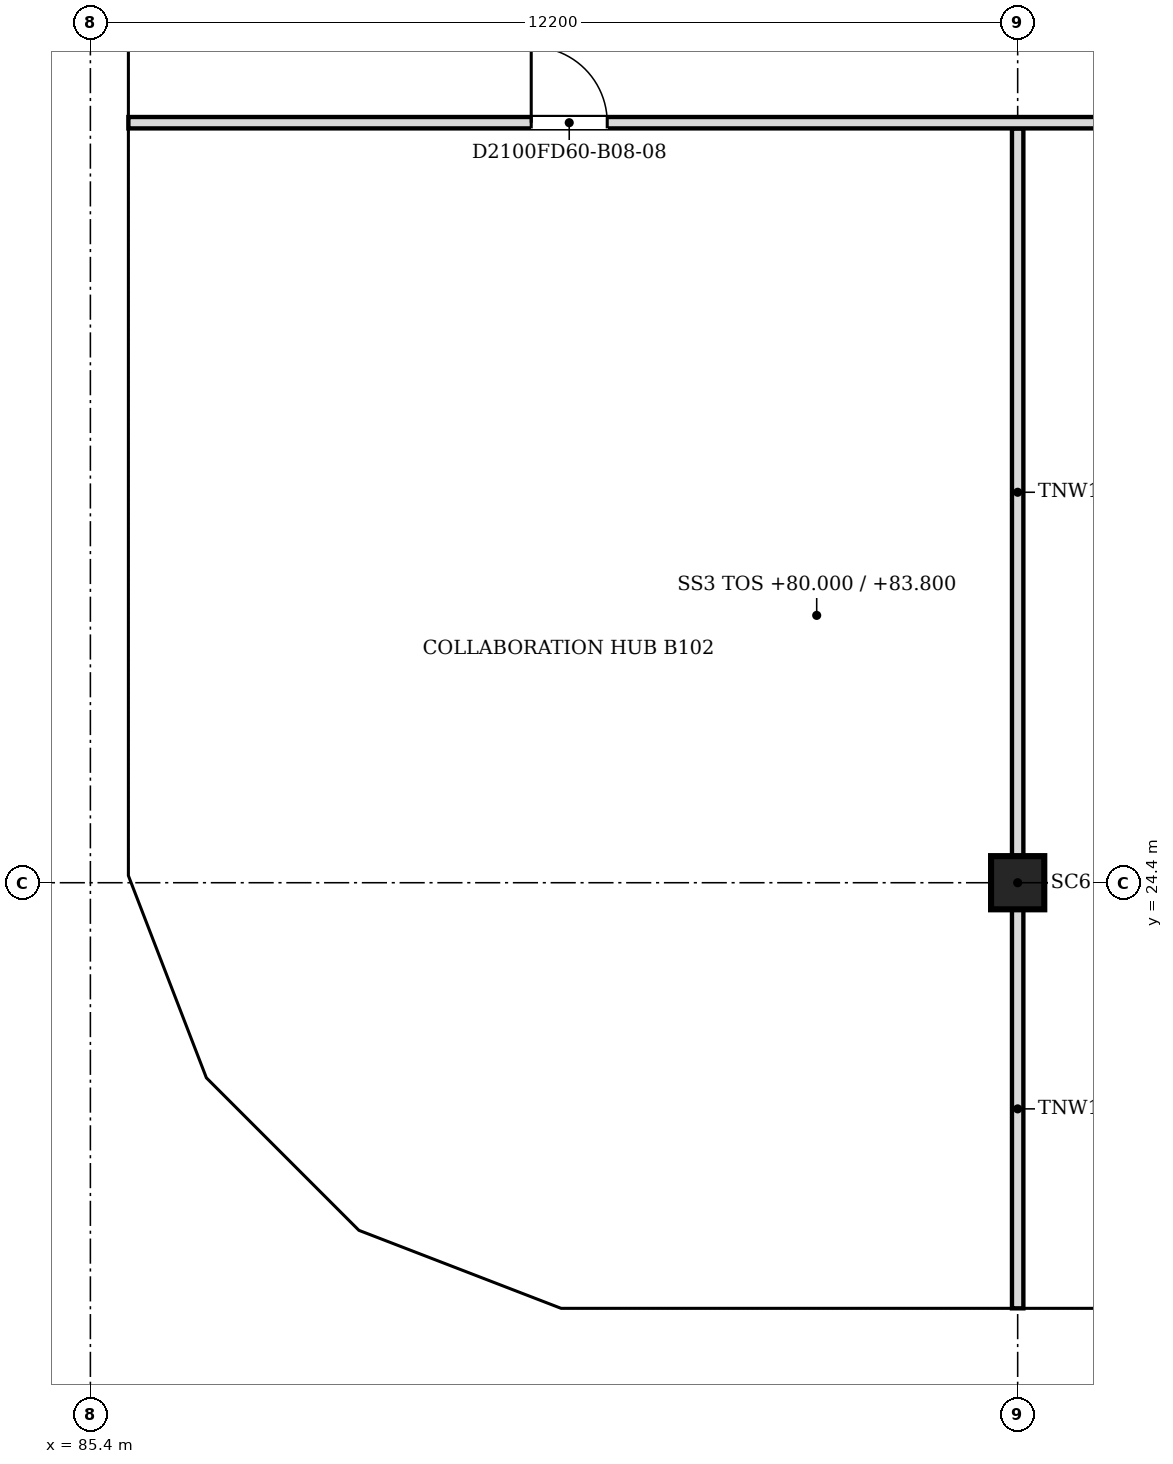
"""IFC4 building model, lengths in metres.
Left out: names, types, materials, properties, quantities, classifications, styles, units other than length and angle.
Written with IfcOpenShell. Run it as: python <this file> out.ifc"""

import sys

from ifc_helpers import new_model, si_unit, direction, frame, frame_2d, origin, origin_2d, place, context, subcontext, project, spatial, polyline, rectangle, outline, extrude, faceted_brep, source, transform, mapped, element, fill, save


model = new_model("IFC4")
c1 = context("Model", 3, precision=1e-05, world=origin(), true_north=direction((0.0, 1.0)))
c2 = subcontext(c1, "Body", "Model", "MODEL_VIEW")
j1 = project(units=[si_unit("LENGTHUNIT", "METRE"), si_unit("PLANEANGLEUNIT", "RADIAN")], contexts=[c1])
p1 = place(None, origin())
s1 = spatial("IfcSite", under=j1, at=p1, CompositionType="ELEMENT")
p2 = place(p1, origin())
s2 = spatial("IfcBuilding", under=s1, at=p2, CompositionType="ELEMENT")
p3 = place(p2, frame((0.0, 0.0, 80.0)))
s3 = spatial("IfcBuildingStorey", under=s2, at=p3, CompositionType="ELEMENT", Elevation=80.0)
p4 = place(p3, frame((97.6, 24.4, 0.0), z_axis=(0.0, 0.0, 1.0), x_axis=(1.0, 0.0, 0.0)))
e1 = element("IfcColumn", 1, at=p4, inside=s3, PredefinedType="COLUMN", context=c2, shape_type="SweptSolid", body=[
    extrude(rectangle(XDim=0.7, YDim=0.7, at=origin_2d()), origin(), (0.0, 0.0, 1.0), 3.6),
])
m1 = source(origin(), c2, "Body", "Brep", [
    faceted_brep([(3.003, -0.25, 0.0), (6.053, -0.25, 3.8), (3.003, -0.25, 7.6), (0.0, -0.25, 3.8), (0.047, 0.25, 3.859), (3.003, 0.25, 7.6), (6.053, 0.25, 3.8), (3.003, 0.25, 0.0), (0.047, 0.25, 3.741), (0.0, 0.0, 3.8)], [[[0, 1, 2, 3]], [[4, 5, 6, 7, 8]], [[7, 6, 1, 0]], [[6, 5, 2, 1]], [[5, 4, 9, 3, 2]], [[8, 7, 0, 3, 9]], [[8, 9, 4]]]),
])
p5 = place(p3, frame((91.547, 18.55, -3.8), z_axis=(0.0, 0.0, 1.0), x_axis=(1.0, 0.0, 0.0)))
e2 = element("IfcWall", 2, at=p5, inside=s3, PredefinedType="SOLIDWALL", context=c2, shape_type="MappedRepresentation", body=[
    mapped(m1, transform((0.0, 0.0, 0.0), scale=1.0)),
])
m2 = source(origin(), c2, "Body", "SweptSolid", [
    extrude(outline(polyline([(3.005, 0.401), (5.733, 3.8), (3.005, 7.199), (0.319, 3.8), (3.005, 0.401)])), frame((0.0, 0.26, 0.0), z_axis=(0.0, -1.0, 0.0), x_axis=(1.0, 0.0, 0.0)), (0.0, 0.0, 1.0), 0.52),
])
p6 = place(p5, origin())
e3 = element("IfcOpeningElement", 3, at=p6, cuts=e2, PredefinedType="OPENING", context=c2, shape_type="MappedRepresentation", body=[
    mapped(m2, transform((0.0, 0.0, 0.0), scale=1.0)),
])
m3 = source(origin(), c2, "Body", "Brep", [
    faceted_brep([(3.05, -0.25, 0.0), (6.1, -0.25, 3.8), (6.1, -0.25, 3.8), (3.05, -0.25, 7.6), (0.0, -0.25, 3.8), (0.0, 0.25, 3.8), (3.05, 0.25, 7.6), (6.1, 0.25, 3.8), (6.1, 0.25, 3.8), (3.05, 0.25, 0.0)], [[[0, 1, 2, 3, 4]], [[5, 6, 7, 8, 9]], [[9, 8, 1, 0]], [[7, 6, 3, 2]], [[6, 5, 4, 3]], [[5, 9, 0, 4]], [[1, 8, 7, 2]]]),
])
p7 = place(p3, frame((97.6, 18.55, -3.8), z_axis=(0.0, 0.0, 1.0), x_axis=(1.0, 0.0, 0.0)))
e4 = element("IfcWall", 4, at=p7, inside=s3, PredefinedType="SOLIDWALL", context=c2, shape_type="MappedRepresentation", body=[
    mapped(m3, transform((0.0, 0.0, 0.0), scale=1.0)),
])
m4 = source(origin(), c2, "Body", "SweptSolid", [
    extrude(outline(polyline([(3.05, 0.399), (5.78, 3.8), (3.05, 7.201), (0.321, 3.8), (3.05, 0.399)])), frame((0.0, 0.26, 0.0), z_axis=(0.0, -1.0, 0.0), x_axis=(1.0, 0.0, 0.0)), (0.0, 0.0, 1.0), 0.52),
])
p8 = place(p7, origin())
e5 = element("IfcOpeningElement", 5, at=p8, cuts=e4, PredefinedType="OPENING", context=c2, shape_type="MappedRepresentation", body=[
    mapped(m4, transform((0.0, 0.0, 0.0), scale=1.0)),
])
p9 = place(p3, frame((85.65, 39.65, -3.8), z_axis=(0.0, 0.0, 1.0), x_axis=(0.0, -1.0, 0.0)))
e6 = element("IfcWall", 6, at=p9, inside=s3, PredefinedType="SOLIDWALL", context=c2, shape_type="MappedRepresentation", body=[
    mapped(m3, transform((0.0, 0.0, 0.0), scale=1.0)),
])
p10 = place(p9, origin())
e7 = element("IfcOpeningElement", 7, at=p10, cuts=e6, PredefinedType="OPENING", context=c2, shape_type="MappedRepresentation", body=[
    mapped(m4, transform((0.0, 0.0, 0.0), scale=1.0)),
])
m5 = source(origin(), c2, "Body", "SweptSolid", [
    extrude(outline(polyline([(3.05, 0.0), (6.1, 3.8), (3.05, 7.6), (0.0, 3.8), (3.05, 0.0)])), frame((0.0, 0.25, 0.0), z_axis=(0.0, -1.0, 0.0), x_axis=(1.0, 0.0, 0.0)), (0.0, 0.0, 1.0), 0.5),
])
p11 = place(p3, frame((85.65, 33.55, -3.8), z_axis=(0.0, 0.0, 1.0), x_axis=(0.0, -1.0, 0.0)))
e8 = element("IfcWall", 8, at=p11, inside=s3, PredefinedType="SOLIDWALL", context=c2, shape_type="MappedRepresentation", body=[
    mapped(m5, transform((0.0, 0.0, 0.0), scale=1.0)),
])
p12 = place(p11, origin())
e9 = element("IfcOpeningElement", 9, at=p12, cuts=e8, PredefinedType="OPENING", context=c2, shape_type="MappedRepresentation", body=[
    mapped(m4, transform((0.0, 0.0, 0.0), scale=1.0)),
])
m6 = source(origin(), c2, "Body", "Brep", [
    faceted_brep([(3.003, -0.25, 0.0), (3.05, -0.25, 0.06), (3.05, -0.25, 7.54), (3.003, -0.25, 7.6), (0.0, -0.25, 3.8), (0.0, 0.25, 3.8), (2.957, 0.25, 7.541), (2.957, 0.25, 0.059), (3.003, 0.0, 0.0), (3.003, 0.0, 7.6)], [[[0, 1, 2, 3, 4]], [[5, 6, 7]], [[1, 0, 8]], [[9, 3, 2]], [[6, 5, 4, 3, 9]], [[5, 7, 8, 0, 4]], [[1, 8, 7, 6, 9, 2]]]),
])
p13 = place(p3, frame((85.65, 27.45, -3.8), z_axis=(0.0, 0.0, 1.0), x_axis=(0.0, -1.0, 0.0)))
e10 = element("IfcWall", 10, at=p13, inside=s3, PredefinedType="SOLIDWALL", context=c2, shape_type="MappedRepresentation", body=[
    mapped(m6, transform((0.0, 0.0, 0.0), scale=1.0)),
])
m7 = source(origin(), c2, "Body", "SweptSolid", [
    extrude(outline(polyline([(2.803, 6.944), (0.319, 3.8), (2.803, 0.656), (2.803, 6.944)])), frame((0.0, 0.26, 0.0), z_axis=(0.0, -1.0, 0.0), x_axis=(1.0, 0.0, 0.0)), (0.0, 0.0, 1.0), 0.52),
])
p14 = place(p13, origin())
e11 = element("IfcOpeningElement", 11, at=p14, cuts=e10, PredefinedType="OPENING", context=c2, shape_type="MappedRepresentation", body=[
    mapped(m7, transform((0.0, 0.0, 0.0), scale=1.0)),
])
m8 = source(origin(), c2, "Body", "Brep", [
    faceted_brep([(0.047, -0.25, 0.0), (2.997, -0.25, 3.8), (0.047, -0.25, 7.6), (0.0, -0.25, 7.541), (0.0, -0.25, 0.059), (0.093, 0.25, 7.54), (2.944, 0.25, 3.868), (2.944, 0.25, 3.732), (0.093, 0.25, 0.06), (2.997, 0.0, 3.8), (0.047, 0.0, 0.0), (0.047, 0.0, 7.6)], [[[0, 1, 2, 3, 4]], [[5, 6, 7, 8]], [[8, 7, 9, 1, 0, 10]], [[6, 5, 11, 2, 1, 9]], [[3, 2, 11]], [[10, 0, 4]], [[8, 10, 4, 3, 11, 5]], [[9, 7, 6]]]),
])
p15 = place(p3, frame((85.633, 24.49, -3.8), z_axis=(0.0, 0.0, 1.0), x_axis=(0.359901446078, -0.932990326376, 0.0)))
e12 = element("IfcWall", 12, at=p15, inside=s3, PredefinedType="SOLIDWALL", context=c2, shape_type="MappedRepresentation", body=[
    mapped(m8, transform((0.0, 0.0, 0.0), scale=1.0)),
])
m9 = source(origin(), c2, "Body", "SweptSolid", [
    extrude(outline(polyline([(0.247, 0.665), (2.681, 3.8), (0.247, 6.935), (0.247, 0.665)])), frame((0.0, 0.26, 0.0), z_axis=(0.0, -1.0, 0.0), x_axis=(1.0, 0.0, 0.0)), (0.0, 0.0, 1.0), 0.52),
])
p16 = place(p15, origin())
e13 = element("IfcOpeningElement", 13, at=p16, cuts=e12, PredefinedType="OPENING", context=c2, shape_type="MappedRepresentation", body=[
    mapped(m9, transform((0.0, 0.0, 0.0), scale=1.0)),
])
m10 = source(origin(), c2, "Body", "Brep", [
    faceted_brep([(2.944, -0.25, 0.0), (2.997, -0.25, 0.068), (2.997, -0.25, 7.532), (2.944, -0.25, 7.6), (0.0, -0.25, 3.8), (0.053, 0.25, 3.868), (2.891, 0.25, 7.532), (2.891, 0.25, 0.068), (0.053, 0.25, 3.732), (2.944, 0.0, 0.0), (2.944, 0.0, 7.6), (0.0, 0.0, 3.8)], [[[0, 1, 2, 3, 4]], [[5, 6, 7, 8]], [[1, 0, 9]], [[10, 3, 2]], [[6, 5, 11, 4, 3, 10]], [[8, 7, 9, 0, 4, 11]], [[8, 11, 5]], [[1, 9, 7, 6, 10, 2]]]),
])
p17 = place(p3, frame((86.712, 21.694, -3.8), z_axis=(0.0, 0.0, 1.0), x_axis=(0.707066050402, -0.707147509625, 0.0)))
e14 = element("IfcWall", 14, at=p17, inside=s3, PredefinedType="SOLIDWALL", context=c2, shape_type="MappedRepresentation", body=[
    mapped(m10, transform((0.0, 0.0, 0.0), scale=1.0)),
])
m11 = source(origin(), c2, "Body", "SweptSolid", [
    extrude(outline(polyline([(2.744, 6.934), (0.316, 3.8), (2.744, 0.666), (2.744, 6.934)])), frame((0.0, 0.26, 0.0), z_axis=(0.0, -1.0, 0.0), x_axis=(1.0, 0.0, 0.0)), (0.0, 0.0, 1.0), 0.52),
])
p18 = place(p17, origin())
e15 = element("IfcOpeningElement", 15, at=p18, cuts=e14, PredefinedType="OPENING", context=c2, shape_type="MappedRepresentation", body=[
    mapped(m11, transform((0.0, 0.0, 0.0), scale=1.0)),
])
m12 = source(origin(), c2, "Body", "Brep", [
    faceted_brep([(0.053, -0.25, 0.0), (3.003, -0.25, 3.8), (0.053, -0.25, 7.6), (0.0, -0.25, 7.532), (0.0, -0.25, 0.068), (0.106, 0.25, 7.532), (2.957, 0.25, 3.86), (2.957, 0.25, 3.74), (0.106, 0.25, 0.068), (3.003, 0.0, 3.8), (0.053, 0.0, 0.0), (0.053, 0.0, 7.6)], [[[0, 1, 2, 3, 4]], [[5, 6, 7, 8]], [[8, 7, 9, 1, 0, 10]], [[6, 5, 11, 2, 1, 9]], [[3, 2, 11]], [[10, 0, 4]], [[8, 10, 4, 3, 11, 5]], [[9, 7, 6]]]),
])
p19 = place(p3, frame((88.744, 19.631, -3.8), z_axis=(0.0, 0.0, 1.0), x_axis=(0.932997369089, -0.359883188373, 0.0)))
e16 = element("IfcWall", 16, at=p19, inside=s3, PredefinedType="SOLIDWALL", context=c2, shape_type="MappedRepresentation", body=[
    mapped(m12, transform((0.0, 0.0, 0.0), scale=1.0)),
])
m13 = source(origin(), c2, "Body", "SweptSolid", [
    extrude(outline(polyline([(0.253, 0.665), (2.687, 3.8), (0.253, 6.935), (0.253, 0.665)])), frame((0.0, 0.26, 0.0), z_axis=(0.0, -1.0, 0.0), x_axis=(1.0, 0.0, 0.0)), (0.0, 0.0, 1.0), 0.52),
])
p20 = place(p19, origin())
e17 = element("IfcOpeningElement", 17, at=p20, cuts=e16, PredefinedType="OPENING", context=c2, shape_type="MappedRepresentation", body=[
    mapped(m13, transform((0.0, 0.0, 0.0), scale=1.0)),
])
p21 = place(p2, frame((0.0, 0.0, 83.8)))
s4 = spatial("IfcBuildingStorey", under=s2, at=p21, CompositionType="ELEMENT", Elevation=83.8)
m14 = source(origin(), c2, "Body", "Brep", [
    faceted_brep([(0.047, -0.25, 0.0), (3.05, -0.25, 3.8), (0.047, -0.25, 7.6), (0.0, -0.25, 7.54), (0.0, -0.25, 0.06), (0.093, 0.25, 7.541), (3.05, 0.25, 3.8), (0.093, 0.25, 0.059), (0.047, 0.0, 0.0), (0.047, 0.0, 7.6)], [[[0, 1, 2, 3, 4]], [[5, 6, 7]], [[7, 6, 1, 0, 8]], [[6, 5, 9, 2, 1]], [[3, 2, 9]], [[8, 0, 4]], [[7, 8, 4, 3, 9, 5]]]),
])
p22 = place(p21, frame((91.5, 18.55, -3.8), z_axis=(0.0, 0.0, 1.0), x_axis=(1.0, 0.0, 0.0)))
e18 = element("IfcWall", 18, at=p22, inside=s4, PredefinedType="SOLIDWALL", context=c2, shape_type="MappedRepresentation", body=[
    mapped(m14, transform((0.0, 0.0, 0.0), scale=1.0)),
])
m15 = source(origin(), c2, "Body", "SweptSolid", [
    extrude(outline(polyline([(0.247, 0.656), (2.731, 3.8), (0.247, 6.944), (0.247, 0.656)])), frame((0.0, 0.26, 0.0), z_axis=(0.0, -1.0, 0.0), x_axis=(1.0, 0.0, 0.0)), (0.0, 0.0, 1.0), 0.52),
])
p23 = place(p22, origin())
e19 = element("IfcOpeningElement", 19, at=p23, cuts=e18, PredefinedType="OPENING", context=c2, shape_type="MappedRepresentation", body=[
    mapped(m15, transform((0.0, 0.0, 0.0), scale=1.0)),
])
m16 = source(origin(), c2, "Body", "Brep", [
    faceted_brep([(2.95, -0.25, 0.0), (2.997, -0.25, 0.059), (2.997, -0.25, 7.541), (2.95, -0.25, 7.6), (0.0, -0.25, 3.8), (0.053, 0.25, 3.868), (2.904, 0.25, 7.54), (2.904, 0.25, 0.06), (0.053, 0.25, 3.732), (2.95, 0.0, 0.0), (2.95, 0.0, 7.6), (0.0, 0.0, 3.8)], [[[0, 1, 2, 3, 4]], [[5, 6, 7, 8]], [[1, 0, 9]], [[10, 3, 2]], [[6, 5, 11, 4, 3, 10]], [[8, 7, 9, 0, 4, 11]], [[8, 11, 5]], [[1, 9, 7, 6, 10, 2]]]),
])
p24 = place(p21, frame((88.794, 19.612, -3.8), z_axis=(0.0, 0.0, 1.0), x_axis=(0.933000876937, -0.359874094142, 0.0)))
e20 = element("IfcWall", 20, at=p24, inside=s4, PredefinedType="SOLIDWALL", context=c2, shape_type="MappedRepresentation", body=[
    mapped(m16, transform((0.0, 0.0, 0.0), scale=1.0)),
])
m17 = source(origin(), c2, "Body", "SweptSolid", [
    extrude(outline(polyline([(2.75, 6.935), (0.316, 3.8), (2.75, 0.665), (2.75, 6.935)])), frame((0.0, 0.26, 0.0), z_axis=(0.0, -1.0, 0.0), x_axis=(1.0, 0.0, 0.0)), (0.0, 0.0, 1.0), 0.52),
])
p25 = place(p24, origin())
e21 = element("IfcOpeningElement", 21, at=p25, cuts=e20, PredefinedType="OPENING", context=c2, shape_type="MappedRepresentation", body=[
    mapped(m17, transform((0.0, 0.0, 0.0), scale=1.0)),
])
p26 = place(p21, frame((94.55, 18.55, -3.8), z_axis=(0.0, 0.0, 1.0), x_axis=(1.0, 0.0, 0.0)))
e22 = element("IfcWall", 22, at=p26, inside=s4, PredefinedType="SOLIDWALL", context=c2, shape_type="MappedRepresentation", body=[
    mapped(m3, transform((0.0, 0.0, 0.0), scale=1.0)),
])
p27 = place(p26, origin())
e23 = element("IfcOpeningElement", 23, at=p27, cuts=e22, PredefinedType="OPENING", context=c2, shape_type="MappedRepresentation", body=[
    mapped(m4, transform((0.0, 0.0, 0.0), scale=1.0)),
])
p28 = place(p21, frame((85.65, 36.6, -3.8), z_axis=(0.0, 0.0, 1.0), x_axis=(0.0, -1.0, 0.0)))
e24 = element("IfcWall", 24, at=p28, inside=s4, PredefinedType="SOLIDWALL", context=c2, shape_type="MappedRepresentation", body=[
    mapped(m5, transform((0.0, 0.0, 0.0), scale=1.0)),
])
p29 = place(p28, origin())
e25 = element("IfcOpeningElement", 25, at=p29, cuts=e24, PredefinedType="OPENING", context=c2, shape_type="MappedRepresentation", body=[
    mapped(m4, transform((0.0, 0.0, 0.0), scale=1.0)),
])
m18 = source(origin(), c2, "Body", "Brep", [
    faceted_brep([(3.05, -0.25, 0.0), (6.053, -0.25, 3.8), (3.05, -0.25, 7.6), (0.0, -0.25, 3.8), (0.0, 0.25, 3.8), (3.05, 0.25, 7.6), (6.007, 0.25, 3.859), (6.007, 0.25, 3.741), (3.05, 0.25, 0.0), (6.053, 0.0, 3.8)], [[[0, 1, 2, 3]], [[4, 5, 6, 7, 8]], [[8, 7, 9, 1, 0]], [[6, 5, 2, 1, 9]], [[5, 4, 3, 2]], [[4, 8, 0, 3]], [[9, 7, 6]]]),
])
p30 = place(p21, frame((85.65, 30.5, -3.8), z_axis=(0.0, 0.0, 1.0), x_axis=(0.0, -1.0, 0.0)))
e26 = element("IfcWall", 26, at=p30, inside=s4, PredefinedType="SOLIDWALL", context=c2, shape_type="MappedRepresentation", body=[
    mapped(m18, transform((0.0, 0.0, 0.0), scale=1.0)),
])
m19 = source(origin(), c2, "Body", "SweptSolid", [
    extrude(outline(polyline([(3.049, 0.401), (5.735, 3.8), (3.049, 7.199), (0.321, 3.8), (3.049, 0.401)])), frame((0.0, 0.26, 0.0), z_axis=(0.0, -1.0, 0.0), x_axis=(1.0, 0.0, 0.0)), (0.0, 0.0, 1.0), 0.52),
])
p31 = place(p30, origin())
e27 = element("IfcOpeningElement", 27, at=p31, cuts=e26, PredefinedType="OPENING", context=c2, shape_type="MappedRepresentation", body=[
    mapped(m19, transform((0.0, 0.0, 0.0), scale=1.0)),
])
m20 = source(origin(), c2, "Body", "Brep", [
    faceted_brep([(2.95, -0.25, 0.0), (3.003, -0.25, 0.068), (3.003, -0.25, 7.532), (2.95, -0.25, 7.6), (0.0, -0.25, 3.8), (0.047, 0.25, 3.86), (2.898, 0.25, 7.532), (2.898, 0.25, 0.068), (0.047, 0.25, 3.74), (2.95, 0.0, 0.0), (2.95, 0.0, 7.6), (0.0, 0.0, 3.8)], [[[0, 1, 2, 3, 4]], [[5, 6, 7, 8]], [[1, 0, 9]], [[10, 3, 2]], [[6, 5, 11, 4, 3, 10]], [[8, 7, 9, 0, 4, 11]], [[8, 11, 5]], [[1, 9, 7, 6, 10, 2]]]),
])
p32 = place(p21, frame((85.65, 24.447, -3.8), z_axis=(0.0, 0.0, 1.0), x_axis=(0.35992665181, -0.932980602862, 0.0)))
e28 = element("IfcWall", 28, at=p32, inside=s4, PredefinedType="SOLIDWALL", context=c2, shape_type="MappedRepresentation", body=[
    mapped(m20, transform((0.0, 0.0, 0.0), scale=1.0)),
])
p33 = place(p32, origin())
e29 = element("IfcOpeningElement", 29, at=p33, cuts=e28, PredefinedType="OPENING", context=c2, shape_type="MappedRepresentation", body=[
    mapped(m17, transform((0.0, 0.0, 0.0), scale=1.0)),
])
m21 = source(origin(), c2, "Body", "Brep", [
    faceted_brep([(0.053, -0.25, 0.0), (2.997, -0.25, 3.8), (0.053, -0.25, 7.6), (0.0, -0.25, 7.532), (0.0, -0.25, 0.068), (0.106, 0.25, 7.532), (2.944, 0.25, 3.868), (2.944, 0.25, 3.732), (0.106, 0.25, 0.068), (2.997, 0.0, 3.8), (0.053, 0.0, 0.0), (0.053, 0.0, 7.6)], [[[0, 1, 2, 3, 4]], [[5, 6, 7, 8]], [[8, 7, 9, 1, 0, 10]], [[6, 5, 11, 2, 1, 9]], [[3, 2, 11]], [[10, 0, 4]], [[8, 10, 4, 3, 11, 5]], [[9, 7, 6]]]),
])
p34 = place(p21, frame((86.675, 21.731, -3.8), z_axis=(0.0, 0.0, 1.0), x_axis=(0.707106781187, -0.707106781187, 0.0)))
e30 = element("IfcWall", 30, at=p34, inside=s4, PredefinedType="SOLIDWALL", context=c2, shape_type="MappedRepresentation", body=[
    mapped(m21, transform((0.0, 0.0, 0.0), scale=1.0)),
])
m22 = source(origin(), c2, "Body", "SweptSolid", [
    extrude(outline(polyline([(0.253, 0.666), (2.681, 3.8), (0.253, 6.934), (0.253, 0.666)])), frame((0.0, 0.26, 0.0), z_axis=(0.0, -1.0, 0.0), x_axis=(1.0, 0.0, 0.0)), (0.0, 0.0, 1.0), 0.52),
])
p35 = place(p34, origin())
e31 = element("IfcOpeningElement", 31, at=p35, cuts=e30, PredefinedType="OPENING", context=c2, shape_type="MappedRepresentation", body=[
    mapped(m22, transform((0.0, 0.0, 0.0), scale=1.0)),
])
p36 = place(p3, frame((97.6, 18.8, 0.0), z_axis=(0.0, 0.0, 1.0), x_axis=(0.0, 1.0, 0.0)))
e32 = element("IfcWall", 32, at=p36, inside=s3, PredefinedType="PARTITIONING", context=c2, shape_type="SweptSolid", body=[
    extrude(rectangle(XDim=5.249, YDim=0.15, at=frame_2d((2.625, 0.0))), origin(), (0.0, 0.0, 1.0), 3.067),
])
p37 = place(p3, frame((97.6, 24.751, 0.0), z_axis=(0.0, 0.0, 1.0), x_axis=(0.0, 1.0, 0.0)))
e33 = element("IfcWall", 33, at=p37, inside=s3, PredefinedType="PARTITIONING", context=c2, shape_type="SweptSolid", body=[
    extrude(rectangle(XDim=9.573, YDim=0.15, at=frame_2d((4.787, 0.0))), origin(), (0.0, 0.0, 1.0), 3.067),
])
p38 = place(p3, frame((133.7, 34.4, 0.0), z_axis=(0.0, 0.0, 1.0), x_axis=(-1.0, 0.0, 0.0)))
e34 = element("IfcWall", 34, at=p38, inside=s3, PredefinedType="PARTITIONING", context=c2, shape_type="SweptSolid", body=[
    extrude(rectangle(XDim=47.8, YDim=0.15, at=frame_2d((23.9, 0.0))), origin(), (0.0, 0.0, 1.0), 3.067),
])
m23 = source(origin(), c2, "Body", "SweptSolid", [
    extrude(rectangle(XDim=1.0, YDim=2.1, at=frame_2d((0.5, 1.05))), frame((0.0, 0.085, 0.0), z_axis=(0.0, -1.0, 0.0), x_axis=(1.0, 0.0, 0.0)), (0.0, 0.0, 1.0), 0.17),
])
p39 = place(p38, frame((2.099, 0.0, 0.0)))
e35 = element("IfcOpeningElement", 35, at=p39, cuts=e34, PredefinedType="OPENING", context=c2, shape_type="MappedRepresentation", body=[
    mapped(m23, transform((0.0, 0.0, 0.0), scale=1.0)),
])
p40 = place(p38, frame((9.149, 0.0, 0.0)))
e36 = element("IfcOpeningElement", 36, at=p40, cuts=e34, PredefinedType="OPENING", context=c2, shape_type="MappedRepresentation", body=[
    mapped(m23, transform((0.0, 0.0, 0.0), scale=1.0)),
])
p41 = place(p38, frame((30.799, 0.0, 0.0)))
e37 = element("IfcOpeningElement", 37, at=p41, cuts=e34, PredefinedType="OPENING", context=c2, shape_type="MappedRepresentation", body=[
    mapped(m23, transform((0.0, 0.0, 0.0), scale=1.0)),
])
p42 = place(p38, frame((41.5, 0.0, 0.0)))
e38 = element("IfcOpeningElement", 38, at=p42, cuts=e34, PredefinedType="OPENING", context=c2, shape_type="MappedRepresentation", body=[
    mapped(m23, transform((0.0, 0.0, 0.0), scale=1.0)),
])
p43 = place(p38, frame((19.85, 0.0, 0.0)))
e39 = element("IfcOpeningElement", 39, at=p43, cuts=e34, PredefinedType="OPENING", context=c2, shape_type="MappedRepresentation", body=[
    mapped(m23, transform((0.0, 0.0, 0.0), scale=1.0)),
])
m24 = source(origin(), c2, "Body", "SweptSolid", [
    extrude(rectangle(XDim=1.0, YDim=2.1, at=frame_2d((0.5, 1.05))), frame((0.0, 0.025, 0.0), z_axis=(0.0, -1.0, 0.0), x_axis=(1.0, 0.0, 0.0)), (0.0, 0.0, 1.0), 0.05),
])
p44 = place(p42, origin())
e40 = element("IfcDoor", 40, at=p44, inside=s3, OperationType="SINGLE_SWING_RIGHT", PredefinedType="DOOR", context=c2, shape_type="MappedRepresentation", body=[
    mapped(m24, transform((0.0, 0.0, 0.0), scale=1.0)),
])
fill(e38, e40)
save(model, sys.argv[1])
